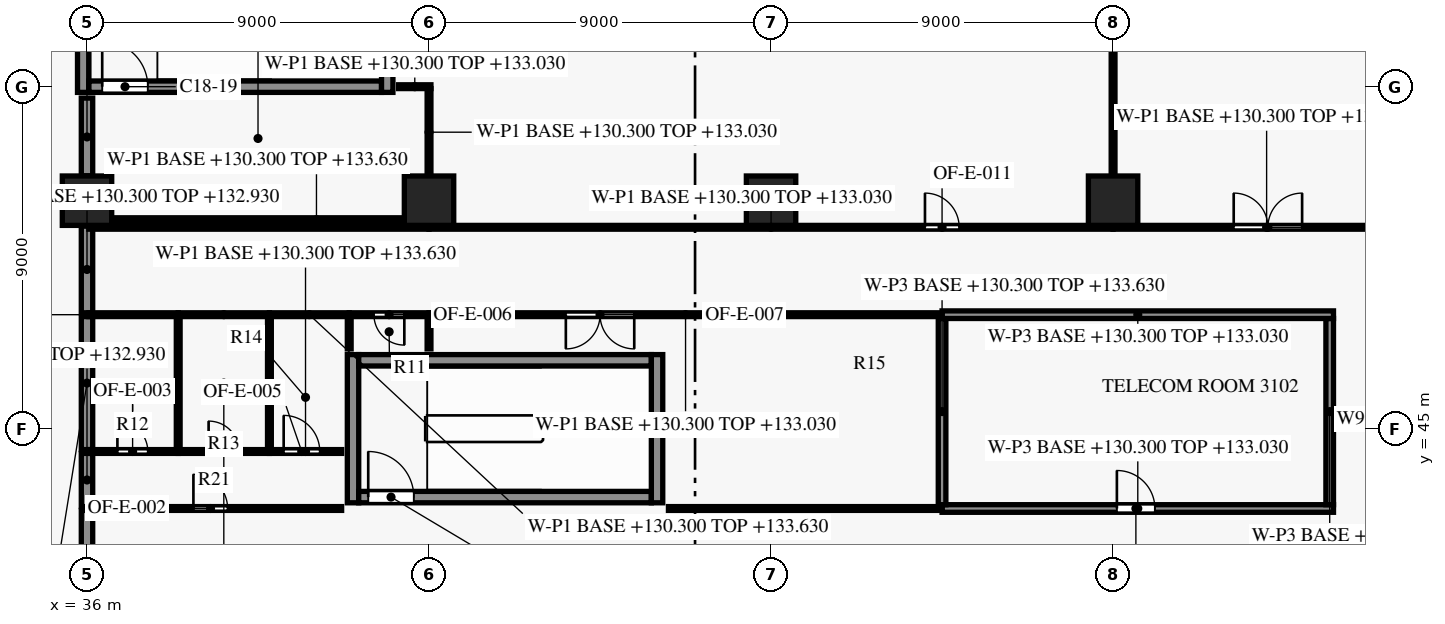
"""IFC4 building model, lengths in metres.
Left out: names, types, materials, properties, quantities, classifications, styles, units other than length and angle.
Written with IfcOpenShell. Run it as: python <this file> out.ifc"""

import sys

from ifc_helpers import new_model, si_unit, direction, frame, frame_2d, origin, origin_2d, place, context, subcontext, project, spatial, rectangle, extrude, element, fill, save


model = new_model("IFC4")
c1 = context("Model", 3, precision=1e-05, world=origin(), true_north=direction((0.0, 1.0)))
c2 = subcontext(c1, "Body", "Model", "MODEL_VIEW")
j1 = project(units=[si_unit("LENGTHUNIT", "METRE"), si_unit("PLANEANGLEUNIT", "RADIAN")], contexts=[c1])
p1 = place(None, origin())
s1 = spatial("IfcSite", under=j1, at=p1, CompositionType="ELEMENT")
p2 = place(p1, origin())
s2 = spatial("IfcBuilding", under=s1, at=p2, CompositionType="ELEMENT")
p3 = place(p2, frame((0.0, 0.0, 130.3)))
s3 = spatial("IfcBuildingStorey", under=s2, at=p3, CompositionType="ELEMENT", Elevation=130.3)
for number, where, z_axis, x_axis in (
    (1, (36.0, 51.0, 0.0), (0.0, 0.0, 1.0), (1.0, 0.0, 0.0)),
    (2, (45.0, 51.0, 0.0), (0.0, 0.0, 1.0), (1.0, 0.0, 0.0)),
    (3, (54.0, 51.0, 0.0), (0.0, 0.0, 1.0), (1.0, 0.0, 0.0)),
    (4, (63.0, 51.0, 0.0), (0.0, 0.0, 1.0), (1.0, 0.0, 0.0)),
):
    element("IfcColumn", number, at=place(p3, frame(where, z_axis=z_axis, x_axis=x_axis)), inside=s3, PredefinedType="COLUMN", context=c2, shape_type="SweptSolid", body=[
        extrude(rectangle(XDim=1.3, YDim=1.3, at=origin_2d()), origin(), (0.0, 0.0, 1.0), 3.8),
    ])
p4 = place(p3, frame((43.15, 43.2, 0.0), z_axis=(0.0, 0.0, 1.0), x_axis=(1.0, 0.0, 0.0)))
e5 = element("IfcWall", 5, at=p4, inside=s3, PredefinedType="SHEAR", context=c2, shape_type="SweptSolid", body=[
    extrude(rectangle(XDim=7.7, YDim=0.3, at=frame_2d((3.85, 0.0))), origin(), (0.0, 0.0, 1.0), 3.5),
])
p5 = place(p4, frame((0.25, 0.0, 0.0)))
e6 = element("IfcOpeningElement", 6, at=p5, cuts=e5, PredefinedType="OPENING", context=c2, shape_type="SweptSolid", body=[
    extrude(rectangle(XDim=1.2, YDim=2.2, at=frame_2d((0.6, 1.1))), frame((0.0, 0.16, 0.0), z_axis=(0.0, -1.0, 0.0), x_axis=(1.0, 0.0, 0.0)), (0.0, 0.0, 1.0), 0.32),
])
p6 = place(p3, frame((43.15, 46.8, 0.0), z_axis=(0.0, 0.0, 1.0), x_axis=(1.0, 0.0, 0.0)))
e7 = element("IfcWall", 7, at=p6, inside=s3, PredefinedType="SHEAR", context=c2, shape_type="SweptSolid", body=[
    extrude(rectangle(XDim=7.7, YDim=0.3, at=frame_2d((3.85, 0.0))), origin(), (0.0, 0.0, 1.0), 3.5),
])
p7 = place(p3, frame((36.05, 54.0, 0.0), z_axis=(0.0, 0.0, 1.0), x_axis=(1.0, 0.0, 0.0)))
e8 = element("IfcWall", 8, at=p7, inside=s3, PredefinedType="SHEAR", context=c2, shape_type="SweptSolid", body=[
    extrude(rectangle(XDim=7.7, YDim=0.3, at=frame_2d((3.85, 0.0))), origin(), (0.0, 0.0, 1.0), 3.5),
])
p8 = place(p7, frame((0.35, 0.0, 0.0)))
e9 = element("IfcOpeningElement", 9, at=p8, cuts=e8, PredefinedType="OPENING", context=c2, shape_type="SweptSolid", body=[
    extrude(rectangle(XDim=1.2, YDim=2.2, at=frame_2d((0.6, 1.1))), frame((0.0, 0.16, 0.0), z_axis=(0.0, -1.0, 0.0), x_axis=(1.0, 0.0, 0.0)), (0.0, 0.0, 1.0), 0.32),
])
for number, where, z_axis, x_axis in (
    (10, (35.9, 53.85, 0.0), (0.0, 0.0, 1.0), (0.0, 1.0, 0.0)),
    (11, (43.0, 43.05, 0.0), (0.0, 0.0, 1.0), (0.0, 1.0, 0.0)),
    (12, (43.9, 53.85, 0.0), (0.0, 0.0, 1.0), (0.0, 1.0, 0.0)),
    (13, (51.0, 43.05, 0.0), (0.0, 0.0, 1.0), (0.0, 1.0, 0.0)),
):
    element("IfcWall", number, at=place(p3, frame(where, z_axis=z_axis, x_axis=x_axis)), inside=s3, PredefinedType="SHEAR", context=c2, shape_type="SweptSolid", body=[
        extrude(rectangle(XDim=3.9, YDim=0.3, at=frame_2d((1.95, 0.0))), origin(), (0.0, 0.0, 1.0), 3.5),
    ])
p9 = place(p3, frame((36.0, 39.67, 0.0), z_axis=(0.0, 0.0, 1.0), x_axis=(0.0, 1.0, 0.0)))
e14 = element("IfcWall", 14, at=p9, inside=s3, PredefinedType="PARTITIONING", context=c2, shape_type="SweptSolid", body=[
    extrude(rectangle(XDim=3.18, YDim=0.3, at=frame_2d((1.59, 0.0))), origin(), (0.0, 0.0, 1.0), 2.63),
])
p10 = place(p3, frame((36.05, 42.9, 0.0), z_axis=(0.0, 0.0, 1.0), x_axis=(1.0, 0.0, 0.0)))
e15 = element("IfcWall", 15, at=p10, inside=s3, PredefinedType="PARTITIONING", context=c2, shape_type="SweptSolid", body=[
    extrude(rectangle(XDim=6.65, YDim=0.1, at=frame_2d((3.325, 0.0))), origin(), (0.0, 0.0, 1.0), 2.63),
])
p11 = place(p10, frame((2.75, 0.0, 0.0)))
e16 = element("IfcOpeningElement", 16, at=p11, cuts=e15, PredefinedType="OPENING", context=c2, shape_type="SweptSolid", body=[
    extrude(rectangle(XDim=0.9, YDim=2.1, at=frame_2d((0.45, 1.05))), frame((0.0, 0.06, 0.0), z_axis=(0.0, -1.0, 0.0), x_axis=(1.0, 0.0, 0.0)), (0.0, 0.0, 1.0), 0.12),
])
p12 = place(p3, frame((51.3, 42.9, 0.0), z_axis=(0.0, 0.0, 1.0), x_axis=(1.0, 0.0, 0.0)))
e17 = element("IfcWall", 17, at=p12, inside=s3, PredefinedType="PARTITIONING", context=c2, shape_type="SweptSolid", body=[
    extrude(rectangle(XDim=7.2, YDim=0.1, at=frame_2d((3.6, 0.0))), origin(), (0.0, 0.0, 1.0), 2.63),
])
p13 = place(p3, frame((58.5, 42.9, 0.0), z_axis=(0.0, 0.0, 1.0), x_axis=(1.0, 0.0, 0.0)))
e18 = element("IfcWall", 18, at=p13, inside=s3, PredefinedType="PARTITIONING", context=c2, shape_type="SweptSolid", body=[
    extrude(rectangle(XDim=10.3, YDim=0.2, at=frame_2d((5.15, 0.0))), origin(), (0.0, 0.0, 1.0), 2.73),
])
p14 = place(p13, frame((4.6, 0.0, 0.0)))
e19 = element("IfcOpeningElement", 19, at=p14, cuts=e18, PredefinedType="OPENING", context=c2, shape_type="SweptSolid", body=[
    extrude(rectangle(XDim=1.0, YDim=2.1, at=frame_2d((0.5, 1.05))), frame((0.0, 0.11, 0.0), z_axis=(0.0, -1.0, 0.0), x_axis=(1.0, 0.0, 0.0)), (0.0, 0.0, 1.0), 0.22),
])
p15 = place(p3, frame((36.0, 42.95, 0.0), z_axis=(0.0, 0.0, 1.0), x_axis=(0.0, 1.0, 0.0)))
e20 = element("IfcWall", 20, at=p15, inside=s3, PredefinedType="PARTITIONING", context=c2, shape_type="SweptSolid", body=[
    extrude(rectangle(XDim=1.4, YDim=0.3, at=frame_2d((0.7, 0.0))), origin(), (0.0, 0.0, 1.0), 2.63),
])
p16 = place(p3, frame((68.7, 43.0, 0.0), z_axis=(0.0, 0.0, 1.0), x_axis=(0.0, 1.0, 0.0)))
e21 = element("IfcWall", 21, at=p16, inside=s3, PredefinedType="PARTITIONING", context=c2, shape_type="SweptSolid", body=[
    extrude(rectangle(XDim=4.9, YDim=0.2, at=frame_2d((2.45, 0.0))), origin(), (0.0, 0.0, 1.0), 3.33),
])
p17 = place(p3, frame((36.05, 44.4, 0.0), z_axis=(0.0, 0.0, 1.0), x_axis=(1.0, 0.0, 0.0)))
e22 = element("IfcWall", 22, at=p17, inside=s3, PredefinedType="PARTITIONING", context=c2, shape_type="SweptSolid", body=[
    extrude(rectangle(XDim=2.35, YDim=0.1, at=frame_2d((1.175, 0.0))), origin(), (0.0, 0.0, 1.0), 2.63),
])
p18 = place(p17, frame((0.75, 0.0, 0.0)))
e23 = element("IfcOpeningElement", 23, at=p18, cuts=e22, PredefinedType="OPENING", context=c2, shape_type="SweptSolid", body=[
    extrude(rectangle(XDim=0.8, YDim=2.1, at=frame_2d((0.4, 1.05))), frame((0.0, 0.06, 0.0), z_axis=(0.0, -1.0, 0.0), x_axis=(1.0, 0.0, 0.0)), (0.0, 0.0, 1.0), 0.12),
])
p19 = place(p3, frame((38.4, 44.4, 0.0), z_axis=(0.0, 0.0, 1.0), x_axis=(1.0, 0.0, 0.0)))
e24 = element("IfcWall", 24, at=p19, inside=s3, PredefinedType="PARTITIONING", context=c2, shape_type="SweptSolid", body=[
    extrude(rectangle(XDim=2.4, YDim=0.1, at=frame_2d((1.2, 0.0))), origin(), (0.0, 0.0, 1.0), 3.33),
])
p20 = place(p19, frame((0.8, 0.0, 0.0)))
e25 = element("IfcOpeningElement", 25, at=p20, cuts=e24, PredefinedType="OPENING", context=c2, shape_type="SweptSolid", body=[
    extrude(rectangle(XDim=0.8, YDim=2.1, at=frame_2d((0.4, 1.05))), frame((0.0, 0.06, 0.0), z_axis=(0.0, -1.0, 0.0), x_axis=(1.0, 0.0, 0.0)), (0.0, 0.0, 1.0), 0.12),
])
p21 = place(p3, frame((40.8, 44.4, 0.0), z_axis=(0.0, 0.0, 1.0), x_axis=(1.0, 0.0, 0.0)))
e26 = element("IfcWall", 26, at=p21, inside=s3, PredefinedType="PARTITIONING", context=c2, shape_type="SweptSolid", body=[
    extrude(rectangle(XDim=1.9, YDim=0.1, at=frame_2d((0.95, 0.0))), origin(), (0.0, 0.0, 1.0), 3.33),
])
p22 = place(p21, frame((0.375, 0.0, 0.0)))
e27 = element("IfcOpeningElement", 27, at=p22, cuts=e26, PredefinedType="OPENING", context=c2, shape_type="SweptSolid", body=[
    extrude(rectangle(XDim=0.95, YDim=2.1, at=frame_2d((0.475, 1.05))), frame((0.0, 0.06, 0.0), z_axis=(0.0, -1.0, 0.0), x_axis=(1.0, 0.0, 0.0)), (0.0, 0.0, 1.0), 0.12),
])
p23 = place(p3, frame((36.0, 44.45, 0.0), z_axis=(0.0, 0.0, 1.0), x_axis=(0.0, 1.0, 0.0)))
e28 = element("IfcWall", 28, at=p23, inside=s3, PredefinedType="PARTITIONING", context=c2, shape_type="SweptSolid", body=[
    extrude(rectangle(XDim=3.5, YDim=0.3, at=frame_2d((1.75, 0.0))), origin(), (0.0, 0.0, 1.0), 2.63),
])
p24 = place(p3, frame((58.5, 47.9, 0.0), z_axis=(0.0, 0.0, 1.0), x_axis=(0.0, -1.0, 0.0)))
e29 = element("IfcWall", 29, at=p24, inside=s3, PredefinedType="PARTITIONING", context=c2, shape_type="SweptSolid", body=[
    extrude(rectangle(XDim=4.9, YDim=0.2, at=frame_2d((2.45, 0.0))), origin(), (0.0, 0.0, 1.0), 3.33),
])
for number, where, z_axis, x_axis in (
    (30, (38.4, 47.95, 0.0), (0.0, 0.0, 1.0), (0.0, -1.0, 0.0)),
    (31, (40.8, 47.95, 0.0), (0.0, 0.0, 1.0), (0.0, -1.0, 0.0)),
):
    element("IfcWall", number, at=place(p3, frame(where, z_axis=z_axis, x_axis=x_axis)), inside=s3, PredefinedType="PARTITIONING", context=c2, shape_type="SweptSolid", body=[
        extrude(rectangle(XDim=3.5, YDim=0.1, at=frame_2d((1.75, 0.0))), origin(), (0.0, 0.0, 1.0), 2.63),
    ])
for number, where, z_axis, x_axis in (
    (32, (42.9, 47.95, 0.0), (0.0, 0.0, 1.0), (0.0, -1.0, 0.0)),
    (33, (45.0, 47.95, 0.0), (0.0, 0.0, 1.0), (0.0, -1.0, 0.0)),
):
    element("IfcWall", number, at=place(p3, frame(where, z_axis=z_axis, x_axis=x_axis)), inside=s3, PredefinedType="PARTITIONING", context=c2, shape_type="SweptSolid", body=[
        extrude(rectangle(XDim=0.85, YDim=0.1, at=frame_2d((0.425, 0.0))), origin(), (0.0, 0.0, 1.0), 2.63),
    ])
p25 = place(p3, frame((38.4, 48.0, 0.0), z_axis=(0.0, 0.0, 1.0), x_axis=(-1.0, 0.0, 0.0)))
e34 = element("IfcWall", 34, at=p25, inside=s3, PredefinedType="PARTITIONING", context=c2, shape_type="SweptSolid", body=[
    extrude(rectangle(XDim=2.35, YDim=0.1, at=frame_2d((1.175, 0.0))), origin(), (0.0, 0.0, 1.0), 2.63),
])
p26 = place(p3, frame((40.8, 48.0, 0.0), z_axis=(0.0, 0.0, 1.0), x_axis=(-1.0, 0.0, 0.0)))
e35 = element("IfcWall", 35, at=p26, inside=s3, PredefinedType="PARTITIONING", context=c2, shape_type="SweptSolid", body=[
    extrude(rectangle(XDim=2.4, YDim=0.1, at=frame_2d((1.2, 0.0))), origin(), (0.0, 0.0, 1.0), 3.33),
])
p27 = place(p3, frame((42.9, 48.0, 0.0), z_axis=(0.0, 0.0, 1.0), x_axis=(-1.0, 0.0, 0.0)))
e36 = element("IfcWall", 36, at=p27, inside=s3, PredefinedType="PARTITIONING", context=c2, shape_type="SweptSolid", body=[
    extrude(rectangle(XDim=2.1, YDim=0.1, at=frame_2d((1.05, 0.0))), origin(), (0.0, 0.0, 1.0), 3.33),
])
p28 = place(p3, frame((45.0, 48.0, 0.0), z_axis=(0.0, 0.0, 1.0), x_axis=(-1.0, 0.0, 0.0)))
e37 = element("IfcWall", 37, at=p28, inside=s3, PredefinedType="PARTITIONING", context=c2, shape_type="SweptSolid", body=[
    extrude(rectangle(XDim=2.1, YDim=0.1, at=frame_2d((1.05, 0.0))), origin(), (0.0, 0.0, 1.0), 2.73),
])
p29 = place(p28, frame((0.65, 0.0, 0.0)))
e38 = element("IfcOpeningElement", 38, at=p29, cuts=e37, PredefinedType="OPENING", context=c2, shape_type="SweptSolid", body=[
    extrude(rectangle(XDim=0.8, YDim=2.1, at=frame_2d((0.4, 1.05))), frame((0.0, 0.06, 0.0), z_axis=(0.0, -1.0, 0.0), x_axis=(1.0, 0.0, 0.0)), (0.0, 0.0, 1.0), 0.12),
])
p30 = place(p3, frame((58.5, 48.0, 0.0), z_axis=(0.0, 0.0, 1.0), x_axis=(-1.0, 0.0, 0.0)))
e39 = element("IfcWall", 39, at=p30, inside=s3, PredefinedType="PARTITIONING", context=c2, shape_type="SweptSolid", body=[
    extrude(rectangle(XDim=13.5, YDim=0.1, at=frame_2d((6.75, 0.0))), origin(), (0.0, 0.0, 1.0), 2.73),
])
p31 = place(p30, frame((8.1, 0.0, 0.0)))
e40 = element("IfcOpeningElement", 40, at=p31, cuts=e39, PredefinedType="OPENING", context=c2, shape_type="SweptSolid", body=[
    extrude(rectangle(XDim=1.8, YDim=2.1, at=frame_2d((0.9, 1.05))), frame((0.0, 0.06, 0.0), z_axis=(0.0, -1.0, 0.0), x_axis=(1.0, 0.0, 0.0)), (0.0, 0.0, 1.0), 0.12),
])
p32 = place(p3, frame((68.8, 48.0, 0.0), z_axis=(0.0, 0.0, 1.0), x_axis=(-1.0, 0.0, 0.0)))
e41 = element("IfcWall", 41, at=p32, inside=s3, PredefinedType="PARTITIONING", context=c2, shape_type="SweptSolid", body=[
    extrude(rectangle(XDim=10.3, YDim=0.2, at=frame_2d((5.15, 0.0))), origin(), (0.0, 0.0, 1.0), 2.73),
])
p33 = place(p3, frame((36.0, 48.05, 0.0), z_axis=(0.0, 0.0, 1.0), x_axis=(0.0, 1.0, 0.0)))
e42 = element("IfcWall", 42, at=p33, inside=s3, PredefinedType="PARTITIONING", context=c2, shape_type="SweptSolid", body=[
    extrude(rectangle(XDim=2.28, YDim=0.3, at=frame_2d((1.14, 0.0))), origin(), (0.0, 0.0, 1.0), 2.63),
])
p34 = place(p3, frame((36.05, 50.3, 0.0), z_axis=(0.0, 0.0, 1.0), x_axis=(1.0, 0.0, 0.0)))
e43 = element("IfcWall", 43, at=p34, inside=s3, PredefinedType="PARTITIONING", context=c2, shape_type="SweptSolid", body=[
    extrude(rectangle(XDim=8.95, YDim=0.1, at=frame_2d((4.475, 0.0))), origin(), (0.0, 0.0, 1.0), 2.63),
])
p35 = place(p3, frame((45.0, 50.3, 0.0), z_axis=(0.0, 0.0, 1.0), x_axis=(1.0, 0.0, 0.0)))
e44 = element("IfcWall", 44, at=p35, inside=s3, PredefinedType="PARTITIONING", context=c2, shape_type="SweptSolid", body=[
    extrude(rectangle(XDim=18.0, YDim=0.1, at=frame_2d((9.0, 0.0))), origin(), (0.0, 0.0, 1.0), 2.73),
])
p36 = place(p35, frame((13.05, 0.0, 0.0)))
e45 = element("IfcOpeningElement", 45, at=p36, cuts=e44, PredefinedType="OPENING", context=c2, shape_type="SweptSolid", body=[
    extrude(rectangle(XDim=0.9, YDim=2.1, at=frame_2d((0.45, 1.05))), frame((0.0, 0.06, 0.0), z_axis=(0.0, -1.0, 0.0), x_axis=(1.0, 0.0, 0.0)), (0.0, 0.0, 1.0), 0.12),
])
p37 = place(p3, frame((63.0, 50.3, 0.0), z_axis=(0.0, 0.0, 1.0), x_axis=(1.0, 0.0, 0.0)))
e46 = element("IfcWall", 46, at=p37, inside=s3, PredefinedType="PARTITIONING", context=c2, shape_type="SweptSolid", body=[
    extrude(rectangle(XDim=8.08, YDim=0.1, at=frame_2d((4.04, 0.0))), origin(), (0.0, 0.0, 1.0), 2.73),
])
p38 = place(p37, frame((3.174, 0.0, 0.0)))
e47 = element("IfcOpeningElement", 47, at=p38, cuts=e46, PredefinedType="OPENING", context=c2, shape_type="SweptSolid", body=[
    extrude(rectangle(XDim=1.8, YDim=2.1, at=frame_2d((0.9, 1.05))), frame((0.0, 0.06, 0.0), z_axis=(0.0, -1.0, 0.0), x_axis=(1.0, 0.0, 0.0)), (0.0, 0.0, 1.0), 0.12),
])
p39 = place(p3, frame((44.345, 50.5, 0.0), z_axis=(0.0, 0.0, 1.0), x_axis=(-1.0, 0.0, 0.0)))
e48 = element("IfcWall", 48, at=p39, inside=s3, PredefinedType="PARTITIONING", context=c2, shape_type="SweptSolid", body=[
    extrude(rectangle(XDim=7.69, YDim=0.1, at=frame_2d((3.845, 0.0))), origin(), (0.0, 0.0, 1.0), 3.33),
])
p40 = place(p3, frame((36.0, 51.655, 0.0), z_axis=(0.0, 0.0, 1.0), x_axis=(0.0, 1.0, 0.0)))
e49 = element("IfcWall", 49, at=p40, inside=s3, PredefinedType="PARTITIONING", context=c2, shape_type="SweptSolid", body=[
    extrude(rectangle(XDim=2.045, YDim=0.3, at=frame_2d((1.022, 0.0))), origin(), (0.0, 0.0, 1.0), 2.63),
])
p41 = place(p3, frame((45.0, 53.95, 0.0), z_axis=(0.0, 0.0, 1.0), x_axis=(0.0, -1.0, 0.0)))
e50 = element("IfcWall", 50, at=p41, inside=s3, PredefinedType="PARTITIONING", context=c2, shape_type="SweptSolid", body=[
    extrude(rectangle(XDim=2.295, YDim=0.1, at=frame_2d((1.147, 0.0))), origin(), (0.0, 0.0, 1.0), 2.73),
])
p42 = place(p3, frame((44.2, 54.0, 0.0), z_axis=(0.0, 0.0, 1.0), x_axis=(1.0, 0.0, 0.0)))
e51 = element("IfcWall", 51, at=p42, inside=s3, PredefinedType="PARTITIONING", context=c2, shape_type="SweptSolid", body=[
    extrude(rectangle(XDim=0.85, YDim=0.1, at=frame_2d((0.425, 0.0))), origin(), (0.0, 0.0, 1.0), 2.73),
])
p43 = place(p3, frame((63.0, 62.976, 0.0), z_axis=(0.0, 0.0, 1.0), x_axis=(0.0, -1.0, 0.0)))
e52 = element("IfcWall", 52, at=p43, inside=s3, PredefinedType="PARTITIONING", context=c2, shape_type="SweptSolid", body=[
    extrude(rectangle(XDim=11.321, YDim=0.1, at=frame_2d((5.66, 0.0))), origin(), (0.0, 0.0, 1.0), 2.73),
])
p44 = place(p8, origin())
e53 = element("IfcDoor", 53, at=p44, inside=s3, OperationType="SINGLE_SWING_LEFT", PredefinedType="DOOR", context=c2, shape_type="SweptSolid", body=[
    extrude(rectangle(XDim=1.2, YDim=2.2, at=frame_2d((0.6, 1.1))), frame((0.0, 0.025, 0.0), z_axis=(0.0, -1.0, 0.0), x_axis=(1.0, 0.0, 0.0)), (0.0, 0.0, 1.0), 0.05),
])
fill(e9, e53)
p45 = place(p5, origin())
e54 = element("IfcDoor", 54, at=p45, inside=s3, OperationType="SINGLE_SWING_RIGHT", PredefinedType="DOOR", context=c2, shape_type="SweptSolid", body=[
    extrude(rectangle(XDim=1.2, YDim=2.2, at=frame_2d((0.6, 1.1))), frame((0.0, 0.025, 0.0), z_axis=(0.0, -1.0, 0.0), x_axis=(1.0, 0.0, 0.0)), (0.0, 0.0, 1.0), 0.05),
])
fill(e6, e54)
p46 = place(p11, origin())
e55 = element("IfcDoor", 55, at=p46, inside=s3, OperationType="SINGLE_SWING_LEFT", PredefinedType="DOOR", context=c2, shape_type="SweptSolid", body=[
    extrude(rectangle(XDim=0.9, YDim=2.1, at=frame_2d((0.45, 1.05))), frame((0.0, 0.025, 0.0), z_axis=(0.0, -1.0, 0.0), x_axis=(1.0, 0.0, 0.0)), (0.0, 0.0, 1.0), 0.05),
])
fill(e16, e55)
p47 = place(p18, origin())
e56 = element("IfcDoor", 56, at=p47, inside=s3, OperationType="SINGLE_SWING_LEFT", PredefinedType="DOOR", context=c2, shape_type="SweptSolid", body=[
    extrude(rectangle(XDim=0.8, YDim=2.1, at=frame_2d((0.4, 1.05))), frame((0.0, 0.025, 0.0), z_axis=(0.0, -1.0, 0.0), x_axis=(1.0, 0.0, 0.0)), (0.0, 0.0, 1.0), 0.05),
])
fill(e23, e56)
p48 = place(p20, origin())
e57 = element("IfcDoor", 57, at=p48, inside=s3, OperationType="SINGLE_SWING_RIGHT", PredefinedType="DOOR", context=c2, shape_type="SweptSolid", body=[
    extrude(rectangle(XDim=0.8, YDim=2.1, at=frame_2d((0.4, 1.05))), frame((0.0, 0.025, 0.0), z_axis=(0.0, -1.0, 0.0), x_axis=(1.0, 0.0, 0.0)), (0.0, 0.0, 1.0), 0.05),
])
fill(e25, e57)
p49 = place(p22, origin())
e58 = element("IfcDoor", 58, at=p49, inside=s3, OperationType="SINGLE_SWING_LEFT", PredefinedType="DOOR", context=c2, shape_type="SweptSolid", body=[
    extrude(rectangle(XDim=0.95, YDim=2.1, at=frame_2d((0.475, 1.05))), frame((0.0, 0.025, 0.0), z_axis=(0.0, -1.0, 0.0), x_axis=(1.0, 0.0, 0.0)), (0.0, 0.0, 1.0), 0.05),
])
fill(e27, e58)
p50 = place(p29, origin())
e59 = element("IfcDoor", 59, at=p50, inside=s3, OperationType="SINGLE_SWING_LEFT", PredefinedType="DOOR", context=c2, shape_type="SweptSolid", body=[
    extrude(rectangle(XDim=0.8, YDim=2.1, at=frame_2d((0.4, 1.05))), frame((0.0, 0.025, 0.0), z_axis=(0.0, -1.0, 0.0), x_axis=(1.0, 0.0, 0.0)), (0.0, 0.0, 1.0), 0.05),
])
fill(e38, e59)
p51 = place(p31, origin())
e60 = element("IfcDoor", 60, at=p51, inside=s3, OperationType="DOUBLE_DOOR_SINGLE_SWING", PredefinedType="DOOR", context=c2, shape_type="SweptSolid", body=[
    extrude(rectangle(XDim=1.8, YDim=2.1, at=frame_2d((0.9, 1.05))), frame((0.0, 0.025, 0.0), z_axis=(0.0, -1.0, 0.0), x_axis=(1.0, 0.0, 0.0)), (0.0, 0.0, 1.0), 0.05),
])
fill(e40, e60)
p52 = place(p14, origin())
e61 = element("IfcDoor", 61, at=p52, inside=s3, OperationType="SINGLE_SWING_RIGHT", PredefinedType="DOOR", context=c2, shape_type="SweptSolid", body=[
    extrude(rectangle(XDim=1.0, YDim=2.1, at=frame_2d((0.5, 1.05))), frame((0.0, 0.025, 0.0), z_axis=(0.0, -1.0, 0.0), x_axis=(1.0, 0.0, 0.0)), (0.0, 0.0, 1.0), 0.05),
])
fill(e19, e61)
p53 = place(p36, origin())
e62 = element("IfcDoor", 62, at=p53, inside=s3, OperationType="SINGLE_SWING_LEFT", PredefinedType="DOOR", context=c2, shape_type="SweptSolid", body=[
    extrude(rectangle(XDim=0.9, YDim=2.1, at=frame_2d((0.45, 1.05))), frame((0.0, 0.025, 0.0), z_axis=(0.0, -1.0, 0.0), x_axis=(1.0, 0.0, 0.0)), (0.0, 0.0, 1.0), 0.05),
])
fill(e45, e62)
p54 = place(p38, origin())
e63 = element("IfcDoor", 63, at=p54, inside=s3, OperationType="DOUBLE_DOOR_SINGLE_SWING", PredefinedType="DOOR", context=c2, shape_type="SweptSolid", body=[
    extrude(rectangle(XDim=1.8, YDim=2.1, at=frame_2d((0.9, 1.05))), frame((0.0, 0.025, 0.0), z_axis=(0.0, -1.0, 0.0), x_axis=(1.0, 0.0, 0.0)), (0.0, 0.0, 1.0), 0.05),
])
fill(e47, e63)
save(model, sys.argv[1])
